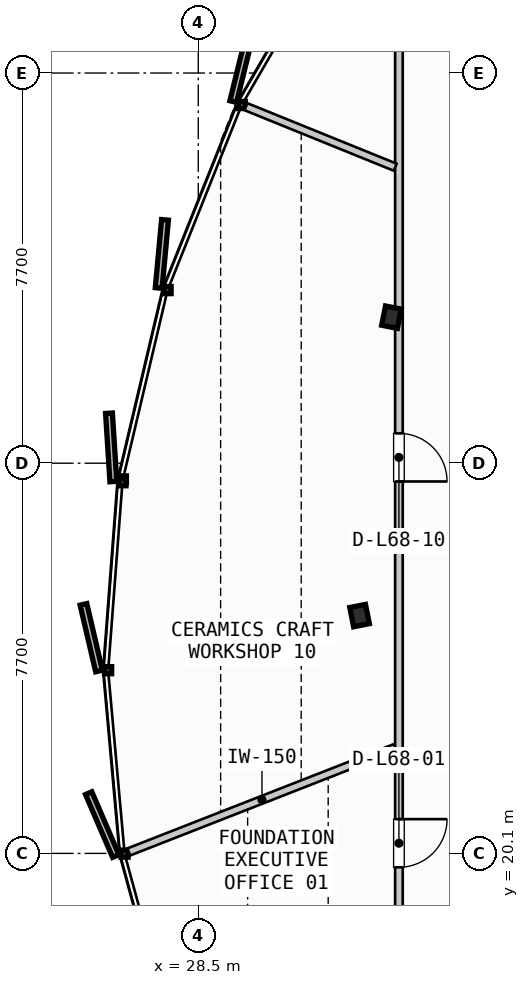
"""IFC4 building model, lengths in metres.
Left out: names, types, materials, properties, quantities, classifications, styles, units other than length and angle.
Written with IfcOpenShell. Run it as: python <this file> out.ifc"""

import sys

from ifc_helpers import new_model, si_unit, direction, frame, frame_2d, origin, origin_2d, place, context, subcontext, project, spatial, rectangle, i_section, extrude, source, transform, mapped, element, fill, save


model = new_model("IFC4")
c1 = context("Model", 3, precision=1e-05, world=origin(), true_north=direction((0.0, 1.0)))
c2 = subcontext(c1, "Body", "Model", "MODEL_VIEW")
j1 = project(units=[si_unit("LENGTHUNIT", "METRE"), si_unit("PLANEANGLEUNIT", "RADIAN")], contexts=[c1])
p1 = place(None, origin())
s1 = spatial("IfcSite", under=j1, at=p1, CompositionType="ELEMENT")
p2 = place(p1, origin())
s2 = spatial("IfcBuilding", under=s1, at=p2, CompositionType="ELEMENT")
p3 = place(p2, frame((0.0, 0.0, 259.45)))
s3 = spatial("IfcBuildingStorey", under=s2, at=p3, CompositionType="ELEMENT", Elevation=259.45)
m1 = source(origin(), c2, "Body", "SweptSolid", [
    extrude(i_section(OverallWidth=0.387, OverallDepth=0.316, WebThickness=0.019, FlangeThickness=0.028, FilletRadius=0.015, at=origin_2d()), origin(), (0.0, 0.0, 1.0), 3.21),
])
for number, where, z_axis, x_axis in (
    (1, (32.312, 30.682, 0.0), (0.0, 0.0, 1.0), (-0.981, 0.195, 0.0)),
    (2, (31.683, 24.793, 0.0), (0.0, 0.0, 1.0), (-0.981, -0.195, 0.0)),
):
    element("IfcColumn", number, at=place(p3, frame(where, z_axis=z_axis, x_axis=x_axis)), inside=s3, PredefinedType="COLUMN", context=c2, shape_type="MappedRepresentation", body=[
        mapped(m1, transform((0.0, 0.0, 0.0), scale=1.0)),
    ])
p4 = place(p3, frame((32.46, 37.331, 0.0), z_axis=(0.0, 0.0, 1.0), x_axis=(0.0, -1.0, 0.0)))
e3 = element("IfcWall", 3, at=p4, inside=s3, PredefinedType="PARTITIONING", context=c2, shape_type="SweptSolid", body=[
    extrude(rectangle(XDim=19.524, YDim=0.15, at=frame_2d((9.762, 0.0))), origin(), (0.0, 0.0, 1.0), 2.735),
])
p5 = place(p4, frame((16.555, 0.0, 0.0)))
e4 = element("IfcOpeningElement", 4, at=p5, cuts=e3, PredefinedType="OPENING", context=c2, shape_type="SweptSolid", body=[
    extrude(rectangle(XDim=0.95, YDim=2.15, at=frame_2d((0.475, 1.075))), frame((0.0, 0.085, 0.0), z_axis=(0.0, -1.0, 0.0), x_axis=(1.0, 0.0, 0.0)), (0.0, 0.0, 1.0), 0.17),
])
p6 = place(p4, frame((8.942, 0.0, 0.0)))
e5 = element("IfcOpeningElement", 5, at=p6, cuts=e3, PredefinedType="OPENING", context=c2, shape_type="SweptSolid", body=[
    extrude(rectangle(XDim=0.95, YDim=2.15, at=frame_2d((0.475, 1.075))), frame((0.0, 0.085, 0.0), z_axis=(0.0, -1.0, 0.0), x_axis=(1.0, 0.0, 0.0)), (0.0, 0.0, 1.0), 0.17),
])
p7 = place(p3, frame((32.385, 22.187, 0.0), z_axis=(0.0, 0.0, 1.0), x_axis=(-0.931177682832, -0.36456566349, 0.0)))
e6 = element("IfcWall", 6, at=p7, inside=s3, PredefinedType="PARTITIONING", context=c2, shape_type="SweptSolid", body=[
    extrude(rectangle(XDim=5.645, YDim=0.15, at=frame_2d((2.823, 0.0))), origin(), (0.0, 0.0, 1.0), 2.735),
])
p8 = place(p3, frame((32.386, 33.642, 0.0), z_axis=(0.0, 0.0, 1.0), x_axis=(-0.92674505075, 0.375690844859, 0.0)))
e7 = element("IfcWall", 7, at=p8, inside=s3, PredefinedType="PARTITIONING", context=c2, shape_type="SweptSolid", body=[
    extrude(rectangle(XDim=3.178, YDim=0.15, at=frame_2d((1.589, 0.0))), origin(), (0.0, 0.0, 1.0), 2.735),
])
m2 = source(origin(), c2, "Body", "SweptSolid", [
    extrude(rectangle(XDim=0.95, YDim=2.15, at=frame_2d((0.475, 1.075))), frame((0.0, 0.025, 0.0), z_axis=(0.0, -1.0, 0.0), x_axis=(1.0, 0.0, 0.0)), (0.0, 0.0, 1.0), 0.05),
])
p9 = place(p5, origin())
e8 = element("IfcDoor", 8, at=p9, inside=s3, OperationType="SINGLE_SWING_LEFT", PredefinedType="DOOR", context=c2, shape_type="MappedRepresentation", body=[
    mapped(m2, transform((0.0, 0.0, 0.0), scale=1.0)),
])
fill(e4, e8)
p10 = place(p6, origin())
e9 = element("IfcDoor", 9, at=p10, inside=s3, OperationType="SINGLE_SWING_RIGHT", PredefinedType="DOOR", context=c2, shape_type="MappedRepresentation", body=[
    mapped(m2, transform((0.0, 0.0, 0.0), scale=1.0)),
])
fill(e5, e9)
save(model, sys.argv[1])
